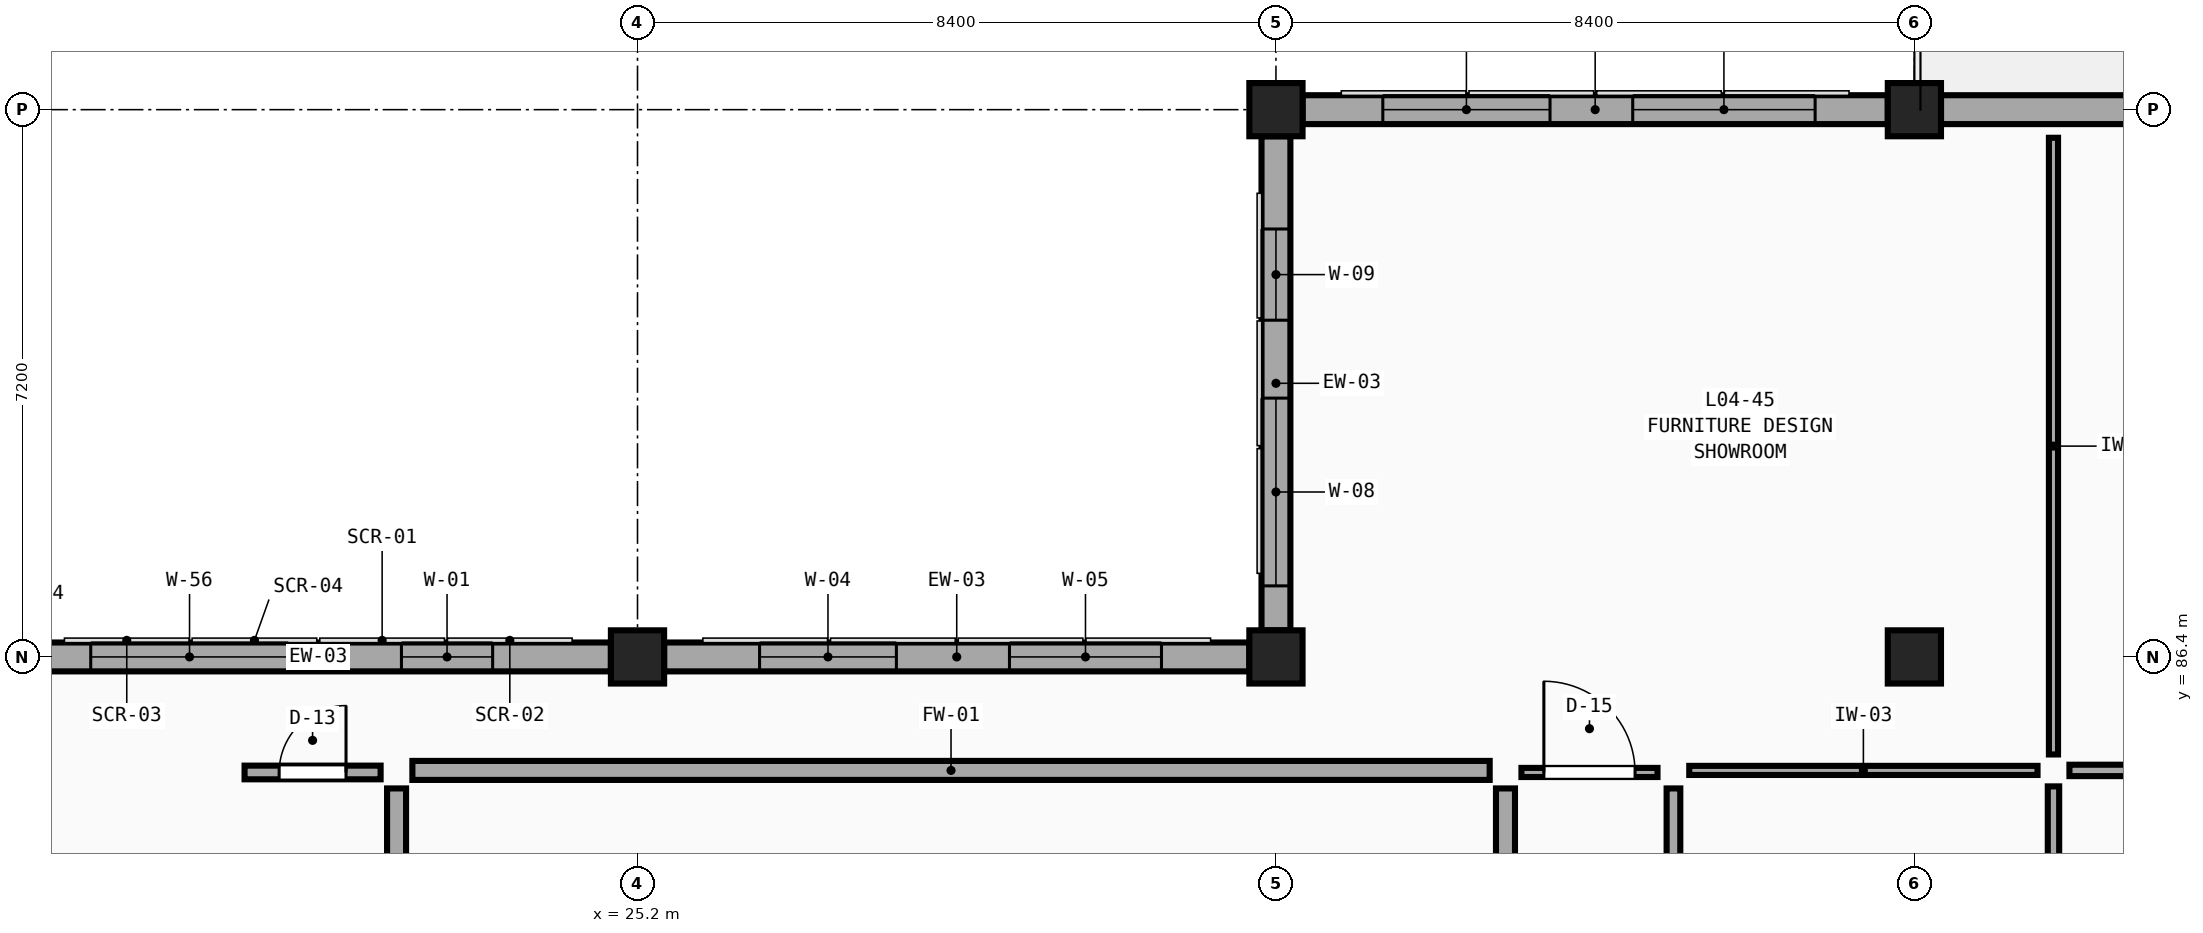
"""IFC4 building model, lengths in metres.
Left out: names, types, materials, properties, quantities, classifications, styles, units other than length and angle.
Written with IfcOpenShell. Run it as: python <this file> out.ifc"""

import sys

from ifc_helpers import new_model, si_unit, direction, frame, frame_2d, origin, origin_2d, place, context, subcontext, project, spatial, rectangle, extrude, element, fill, save


model = new_model("IFC4")
c1 = context("Model", 3, precision=1e-05, world=origin(), true_north=direction((0.0, 1.0)))
c2 = subcontext(c1, "Body", "Model", "MODEL_VIEW")
j1 = project(units=[si_unit("LENGTHUNIT", "METRE"), si_unit("PLANEANGLEUNIT", "RADIAN")], contexts=[c1])
p1 = place(None, origin())
s1 = spatial("IfcSite", under=j1, at=p1, CompositionType="ELEMENT")
p2 = place(p1, origin())
s2 = spatial("IfcBuilding", under=s1, at=p2, CompositionType="ELEMENT")
p3 = place(p2, frame((0.0, 0.0, 18.9)))
s3 = spatial("IfcBuildingStorey", under=s2, at=p3, CompositionType="ELEMENT", Elevation=18.9)
for number, where, z_axis, x_axis in (
    (1, (25.2, 86.4, 0.0), (0.0, 0.0, 1.0), (1.0, 0.0, 0.0)),
    (2, (33.6, 86.4, 0.0), (0.0, 0.0, 1.0), (1.0, 0.0, 0.0)),
    (3, (33.6, 93.6, 0.0), (0.0, 0.0, 1.0), (1.0, 0.0, 0.0)),
    (4, (42.0, 86.4, 0.0), (0.0, 0.0, 1.0), (1.0, 0.0, 0.0)),
    (5, (42.0, 93.6, 0.0), (0.0, 0.0, 1.0), (1.0, 0.0, 0.0)),
):
    element("IfcColumn", number, at=place(p3, frame(where, z_axis=z_axis, x_axis=x_axis)), inside=s3, PredefinedType="COLUMN", context=c2, shape_type="SweptSolid", body=[
        extrude(rectangle(XDim=0.7, YDim=0.7, at=origin_2d()), origin(), (0.0, 0.0, 1.0), 4.5),
    ])
p4 = place(p3, frame((17.15, 86.4, 0.0), z_axis=(0.0, 0.0, 1.0), x_axis=(1.0, 0.0, 0.0)))
e6 = element("IfcWall", 6, at=p4, inside=s3, PredefinedType="SOLIDWALL", context=c2, shape_type="SweptSolid", body=[
    extrude(rectangle(XDim=7.7, YDim=0.38, at=frame_2d((3.85, 0.0))), origin(), (0.0, 0.0, 1.0), 3.63),
])
p5 = place(p4, frame((0.856, 0.0, 0.75)))
e7 = element("IfcOpeningElement", 7, at=p5, cuts=e6, PredefinedType="OPENING", context=c2, shape_type="SweptSolid", body=[
    extrude(rectangle(XDim=2.6, YDim=2.73, at=frame_2d((1.3, 1.365))), frame((0.0, 0.21, 0.0), z_axis=(0.0, -1.0, 0.0), x_axis=(1.0, 0.0, 0.0)), (0.0, 0.0, 1.0), 0.42),
])
p6 = place(p4, frame((4.944, 0.0, 0.75)))
e8 = element("IfcOpeningElement", 8, at=p6, cuts=e6, PredefinedType="OPENING", context=c2, shape_type="SweptSolid", body=[
    extrude(rectangle(XDim=1.2, YDim=1.9, at=frame_2d((0.6, 0.95))), frame((0.0, 0.21, 0.0), z_axis=(0.0, -1.0, 0.0), x_axis=(1.0, 0.0, 0.0)), (0.0, 0.0, 1.0), 0.42),
])
p7 = place(p3, frame((25.55, 86.4, 0.0), z_axis=(0.0, 0.0, 1.0), x_axis=(1.0, 0.0, 0.0)))
e9 = element("IfcWall", 9, at=p7, inside=s3, PredefinedType="SOLIDWALL", context=c2, shape_type="SweptSolid", body=[
    extrude(rectangle(XDim=7.7, YDim=0.38, at=frame_2d((3.85, 0.0))), origin(), (0.0, 0.0, 1.0), 3.63),
])
p8 = place(p7, frame((1.256, 0.0, 0.75)))
e10 = element("IfcOpeningElement", 10, at=p8, cuts=e9, PredefinedType="OPENING", context=c2, shape_type="SweptSolid", body=[
    extrude(rectangle(XDim=1.8, YDim=1.9, at=frame_2d((0.9, 0.95))), frame((0.0, 0.21, 0.0), z_axis=(0.0, -1.0, 0.0), x_axis=(1.0, 0.0, 0.0)), (0.0, 0.0, 1.0), 0.42),
])
p9 = place(p7, frame((4.544, 0.0, 0.75)))
e11 = element("IfcOpeningElement", 11, at=p9, cuts=e9, PredefinedType="OPENING", context=c2, shape_type="SweptSolid", body=[
    extrude(rectangle(XDim=2.0, YDim=1.9, at=frame_2d((1.0, 0.95))), frame((0.0, 0.21, 0.0), z_axis=(0.0, -1.0, 0.0), x_axis=(1.0, 0.0, 0.0)), (0.0, 0.0, 1.0), 0.42),
])
p10 = place(p3, frame((33.95, 93.6, 0.0), z_axis=(0.0, 0.0, 1.0), x_axis=(1.0, 0.0, 0.0)))
e12 = element("IfcWall", 12, at=p10, inside=s3, PredefinedType="SOLIDWALL", context=c2, shape_type="SweptSolid", body=[
    extrude(rectangle(XDim=7.7, YDim=0.38, at=frame_2d((3.85, 0.0))), origin(), (0.0, 0.0, 1.0), 3.63),
])
p11 = place(p10, frame((1.056, 0.0, 0.75)))
e13 = element("IfcOpeningElement", 13, at=p11, cuts=e12, PredefinedType="OPENING", context=c2, shape_type="SweptSolid", body=[
    extrude(rectangle(XDim=2.2, YDim=1.9, at=frame_2d((1.1, 0.95))), frame((0.0, 0.21, 0.0), z_axis=(0.0, -1.0, 0.0), x_axis=(1.0, 0.0, 0.0)), (0.0, 0.0, 1.0), 0.42),
])
p12 = place(p10, frame((4.344, 0.0, 0.75)))
e14 = element("IfcOpeningElement", 14, at=p12, cuts=e12, PredefinedType="OPENING", context=c2, shape_type="SweptSolid", body=[
    extrude(rectangle(XDim=2.4, YDim=1.9, at=frame_2d((1.2, 0.95))), frame((0.0, 0.21, 0.0), z_axis=(0.0, -1.0, 0.0), x_axis=(1.0, 0.0, 0.0)), (0.0, 0.0, 1.0), 0.42),
])
p13 = place(p3, frame((33.6, 86.75, 0.0), z_axis=(0.0, 0.0, 1.0), x_axis=(0.0, 1.0, 0.0)))
e15 = element("IfcWall", 15, at=p13, inside=s3, PredefinedType="SOLIDWALL", context=c2, shape_type="SweptSolid", body=[
    extrude(rectangle(XDim=6.5, YDim=0.38, at=frame_2d((3.25, 0.0))), origin(), (0.0, 0.0, 1.0), 3.63),
])
p14 = place(p13, frame((0.585, 0.0, 0.75)))
e16 = element("IfcOpeningElement", 16, at=p14, cuts=e15, PredefinedType="OPENING", context=c2, shape_type="SweptSolid", body=[
    extrude(rectangle(XDim=2.47, YDim=1.9, at=frame_2d((1.235, 0.95))), frame((0.0, 0.21, 0.0), z_axis=(0.0, -1.0, 0.0), x_axis=(1.0, 0.0, 0.0)), (0.0, 0.0, 1.0), 0.42),
])
p15 = place(p13, frame((4.08, 0.0, 0.75)))
e17 = element("IfcOpeningElement", 17, at=p15, cuts=e15, PredefinedType="OPENING", context=c2, shape_type="SweptSolid", body=[
    extrude(rectangle(XDim=1.2, YDim=2.08, at=frame_2d((0.6, 1.04))), frame((0.0, 0.21, 0.0), z_axis=(0.0, -1.0, 0.0), x_axis=(1.0, 0.0, 0.0)), (0.0, 0.0, 1.0), 0.42),
])
p16 = place(p3, frame((42.35, 93.6, 0.0), z_axis=(0.0, 0.0, 1.0), x_axis=(1.0, 0.0, 0.0)))
e18 = element("IfcWall", 18, at=p16, inside=s3, PredefinedType="SOLIDWALL", context=c2, shape_type="SweptSolid", body=[
    extrude(rectangle(XDim=7.7, YDim=0.38, at=frame_2d((3.85, 0.0))), origin(), (0.0, 0.0, 1.0), 3.63),
])
p17 = place(p16, frame((2.95, 0.0, 0.0)))
e19 = element("IfcOpeningElement", 19, at=p17, cuts=e18, PredefinedType="OPENING", context=c2, shape_type="SweptSolid", body=[
    extrude(rectangle(XDim=1.8, YDim=2.25, at=frame_2d((0.9, 1.125))), frame((0.0, 0.21, 0.0), z_axis=(0.0, -1.0, 0.0), x_axis=(1.0, 0.0, 0.0)), (0.0, 0.0, 1.0), 0.42),
])
p18 = place(p3, frame((38.83, 73.62, 0.0), z_axis=(0.0, 0.0, 1.0), x_axis=(0.0, 1.0, 0.0)))
e20 = element("IfcWall", 20, at=p18, inside=s3, PredefinedType="PARTITIONING", context=c2, shape_type="SweptSolid", body=[
    extrude(rectangle(XDim=11.05, YDim=0.18, at=frame_2d((5.525, 0.0))), origin(), (0.0, 0.0, 1.0), 4.18),
])
p19 = place(p18, frame((4.845, 0.0, 0.0)))
e21 = element("IfcOpeningElement", 21, at=p19, cuts=e20, PredefinedType="OPENING", context=c2, shape_type="SweptSolid", body=[
    extrude(rectangle(XDim=1.36, YDim=2.29, at=frame_2d((0.68, 1.145))), frame((0.0, 0.11, 0.0), z_axis=(0.0, -1.0, 0.0), x_axis=(1.0, 0.0, 0.0)), (0.0, 0.0, 1.0), 0.22),
])
p20 = place(p3, frame((22.03, 73.78, 0.0), z_axis=(0.0, 0.0, 1.0), x_axis=(0.0, 1.0, 0.0)))
e22 = element("IfcWall", 22, at=p20, inside=s3, PredefinedType="SOLIDWALL", context=c2, shape_type="SweptSolid", body=[
    extrude(rectangle(XDim=10.89, YDim=0.25, at=frame_2d((5.445, 0.0))), origin(), (0.0, 0.0, 1.0), 4.18),
])
p21 = place(p20, frame((4.545, 0.0, 0.0)))
e23 = element("IfcOpeningElement", 23, at=p21, cuts=e22, PredefinedType="OPENING", context=c2, shape_type="SweptSolid", body=[
    extrude(rectangle(XDim=1.8, YDim=2.3, at=frame_2d((0.9, 1.15))), frame((0.0, 0.145, 0.0), z_axis=(0.0, -1.0, 0.0), x_axis=(1.0, 0.0, 0.0)), (0.0, 0.0, 1.0), 0.29),
])
p22 = place(p3, frame((36.62, 74.04, 0.0), z_axis=(0.0, 0.0, 1.0), x_axis=(0.0, 1.0, 0.0)))
e24 = element("IfcWall", 24, at=p22, inside=s3, PredefinedType="SOLIDWALL", context=c2, shape_type="SweptSolid", body=[
    extrude(rectangle(XDim=10.63, YDim=0.25, at=frame_2d((5.315, 0.0))), origin(), (0.0, 0.0, 1.0), 4.18),
])
p23 = place(p22, frame((4.415, 0.0, 0.0)))
e25 = element("IfcOpeningElement", 25, at=p23, cuts=e24, PredefinedType="OPENING", context=c2, shape_type="SweptSolid", body=[
    extrude(rectangle(XDim=1.8, YDim=2.3, at=frame_2d((0.9, 1.15))), frame((0.0, 0.145, 0.0), z_axis=(0.0, -1.0, 0.0), x_axis=(1.0, 0.0, 0.0)), (0.0, 0.0, 1.0), 0.29),
])
p24 = place(p3, frame((20.03, 84.88, 0.0), z_axis=(0.0, 0.0, 1.0), x_axis=(1.0, 0.0, 0.0)))
e26 = element("IfcWall", 26, at=p24, inside=s3, PredefinedType="PARTITIONING", context=c2, shape_type="SweptSolid", body=[
    extrude(rectangle(XDim=1.79, YDim=0.18, at=frame_2d((0.895, 0.0))), origin(), (0.0, 0.0, 1.0), 4.18),
])
p25 = place(p24, frame((0.455, 0.0, 0.0)))
e27 = element("IfcOpeningElement", 27, at=p25, cuts=e26, PredefinedType="OPENING", context=c2, shape_type="SweptSolid", body=[
    extrude(rectangle(XDim=0.88, YDim=2.21, at=frame_2d((0.44, 1.105))), frame((0.0, 0.11, 0.0), z_axis=(0.0, -1.0, 0.0), x_axis=(1.0, 0.0, 0.0)), (0.0, 0.0, 1.0), 0.22),
])
p26 = place(p3, frame((36.83, 84.88, 0.0), z_axis=(0.0, 0.0, 1.0), x_axis=(1.0, 0.0, 0.0)))
e28 = element("IfcWall", 28, at=p26, inside=s3, PredefinedType="PARTITIONING", context=c2, shape_type="SweptSolid", body=[
    extrude(rectangle(XDim=1.79, YDim=0.12, at=frame_2d((0.895, 0.0))), origin(), (0.0, 0.0, 1.0), 4.18),
])
p27 = place(p26, frame((0.295, 0.0, 0.0)))
e29 = element("IfcOpeningElement", 29, at=p27, cuts=e28, PredefinedType="OPENING", context=c2, shape_type="SweptSolid", body=[
    extrude(rectangle(XDim=1.2, YDim=2.21, at=frame_2d((0.6, 1.105))), frame((0.0, 0.08, 0.0), z_axis=(0.0, -1.0, 0.0), x_axis=(1.0, 0.0, 0.0)), (0.0, 0.0, 1.0), 0.16),
])
p28 = place(p3, frame((22.238, 84.907, 0.0), z_axis=(0.0, 0.0, 1.0), x_axis=(1.0, 0.0, 0.0)))
e30 = element("IfcWall", 30, at=p28, inside=s3, PredefinedType="SOLIDWALL", context=c2, shape_type="SweptSolid", body=[
    extrude(rectangle(XDim=14.174, YDim=0.25, at=frame_2d((7.087, 0.0))), origin(), (0.0, 0.0, 1.0), 4.18),
])
p29 = place(p3, frame((43.83, 73.88, 0.0), z_axis=(0.0, 0.0, 1.0), x_axis=(0.0, 1.0, 0.0)))
e31 = element("IfcWall", 31, at=p29, inside=s3, PredefinedType="PARTITIONING", context=c2, shape_type="SweptSolid", body=[
    extrude(rectangle(XDim=10.817, YDim=0.15, at=frame_2d((5.409, 0.0))), origin(), (0.0, 0.0, 1.0), 4.18),
])
p30 = place(p3, frame((44.04, 84.907, 0.0), z_axis=(0.0, 0.0, 1.0), x_axis=(1.0, 0.0, 0.0)))
e32 = element("IfcWall", 32, at=p30, inside=s3, PredefinedType="PARTITIONING", context=c2, shape_type="SweptSolid", body=[
    extrude(rectangle(XDim=9.17, YDim=0.15, at=frame_2d((4.585, 0.0))), origin(), (0.0, 0.0, 1.0), 4.18),
])
p31 = place(p3, frame((43.83, 85.117, 0.0), z_axis=(0.0, 0.0, 1.0), x_axis=(0.0, 1.0, 0.0)))
e33 = element("IfcWall", 33, at=p31, inside=s3, PredefinedType="PARTITIONING", context=c2, shape_type="SweptSolid", body=[
    extrude(rectangle(XDim=8.113, YDim=0.12, at=frame_2d((4.057, 0.0))), origin(), (0.0, 0.0, 1.0), 4.18),
])
p32 = place(p3, frame((39.038, 84.907, 0.0), z_axis=(0.0, 0.0, 1.0), x_axis=(1.0, 0.0, 0.0)))
e34 = element("IfcWall", 34, at=p32, inside=s3, PredefinedType="PARTITIONING", context=c2, shape_type="SweptSolid", body=[
    extrude(rectangle(XDim=4.582, YDim=0.12, at=frame_2d((2.291, 0.0))), origin(), (0.0, 0.0, 1.0), 4.18),
])
p33 = place(p5, origin())
e35 = element("IfcWindow", 35, at=p33, inside=s3, PartitioningType="TRIPLE_PANEL_VERTICAL", PredefinedType="WINDOW", context=c2, shape_type="SweptSolid", body=[
    extrude(rectangle(XDim=2.6, YDim=2.73, at=frame_2d((1.3, 1.365))), frame((0.0, 0.03, 0.0), z_axis=(0.0, -1.0, 0.0), x_axis=(1.0, 0.0, 0.0)), (0.0, 0.0, 1.0), 0.06),
])
fill(e7, e35)
p34 = place(p6, origin())
e36 = element("IfcWindow", 36, at=p34, inside=s3, PartitioningType="SINGLE_PANEL", PredefinedType="WINDOW", context=c2, shape_type="SweptSolid", body=[
    extrude(rectangle(XDim=1.2, YDim=1.9, at=frame_2d((0.6, 0.95))), frame((0.0, 0.03, 0.0), z_axis=(0.0, -1.0, 0.0), x_axis=(1.0, 0.0, 0.0)), (0.0, 0.0, 1.0), 0.06),
])
fill(e8, e36)
p35 = place(p8, origin())
e37 = element("IfcWindow", 37, at=p35, inside=s3, PartitioningType="DOUBLE_PANEL_VERTICAL", PredefinedType="WINDOW", context=c2, shape_type="SweptSolid", body=[
    extrude(rectangle(XDim=1.8, YDim=1.9, at=frame_2d((0.9, 0.95))), frame((0.0, 0.03, 0.0), z_axis=(0.0, -1.0, 0.0), x_axis=(1.0, 0.0, 0.0)), (0.0, 0.0, 1.0), 0.06),
])
fill(e10, e37)
p36 = place(p9, origin())
e38 = element("IfcWindow", 38, at=p36, inside=s3, PartitioningType="TRIPLE_PANEL_VERTICAL", PredefinedType="WINDOW", context=c2, shape_type="SweptSolid", body=[
    extrude(rectangle(XDim=2.0, YDim=1.9, at=frame_2d((1.0, 0.95))), frame((0.0, 0.03, 0.0), z_axis=(0.0, -1.0, 0.0), x_axis=(1.0, 0.0, 0.0)), (0.0, 0.0, 1.0), 0.06),
])
fill(e11, e38)
p37 = place(p11, origin())
e39 = element("IfcWindow", 39, at=p37, inside=s3, PartitioningType="TRIPLE_PANEL_VERTICAL", PredefinedType="WINDOW", context=c2, shape_type="SweptSolid", body=[
    extrude(rectangle(XDim=2.2, YDim=1.9, at=frame_2d((1.1, 0.95))), frame((0.0, 0.03, 0.0), z_axis=(0.0, -1.0, 0.0), x_axis=(1.0, 0.0, 0.0)), (0.0, 0.0, 1.0), 0.06),
])
fill(e13, e39)
p38 = place(p12, origin())
e40 = element("IfcWindow", 40, at=p38, inside=s3, PartitioningType="TRIPLE_PANEL_VERTICAL", PredefinedType="WINDOW", context=c2, shape_type="SweptSolid", body=[
    extrude(rectangle(XDim=2.4, YDim=1.9, at=frame_2d((1.2, 0.95))), frame((0.0, 0.03, 0.0), z_axis=(0.0, -1.0, 0.0), x_axis=(1.0, 0.0, 0.0)), (0.0, 0.0, 1.0), 0.06),
])
fill(e14, e40)
p39 = place(p14, origin())
e41 = element("IfcWindow", 41, at=p39, inside=s3, PartitioningType="TRIPLE_PANEL_VERTICAL", PredefinedType="WINDOW", context=c2, shape_type="SweptSolid", body=[
    extrude(rectangle(XDim=2.47, YDim=1.9, at=frame_2d((1.235, 0.95))), frame((0.0, 0.03, 0.0), z_axis=(0.0, -1.0, 0.0), x_axis=(1.0, 0.0, 0.0)), (0.0, 0.0, 1.0), 0.06),
])
fill(e16, e41)
p40 = place(p15, origin())
e42 = element("IfcWindow", 42, at=p40, inside=s3, PartitioningType="SINGLE_PANEL", PredefinedType="WINDOW", context=c2, shape_type="SweptSolid", body=[
    extrude(rectangle(XDim=1.2, YDim=2.08, at=frame_2d((0.6, 1.04))), frame((0.0, 0.03, 0.0), z_axis=(0.0, -1.0, 0.0), x_axis=(1.0, 0.0, 0.0)), (0.0, 0.0, 1.0), 0.06),
])
fill(e17, e42)
p41 = place(p25, origin())
e43 = element("IfcDoor", 43, at=p41, inside=s3, OperationType="SINGLE_SWING_RIGHT", PredefinedType="DOOR", context=c2, shape_type="SweptSolid", body=[
    extrude(rectangle(XDim=0.88, YDim=2.21, at=frame_2d((0.44, 1.105))), frame((0.0, 0.025, 0.0), z_axis=(0.0, -1.0, 0.0), x_axis=(1.0, 0.0, 0.0)), (0.0, 0.0, 1.0), 0.05),
])
fill(e27, e43)
p42 = place(p27, origin())
e44 = element("IfcDoor", 44, at=p42, inside=s3, OperationType="SINGLE_SWING_LEFT", PredefinedType="DOOR", context=c2, shape_type="SweptSolid", body=[
    extrude(rectangle(XDim=1.2, YDim=2.21, at=frame_2d((0.6, 1.105))), frame((0.0, 0.025, 0.0), z_axis=(0.0, -1.0, 0.0), x_axis=(1.0, 0.0, 0.0)), (0.0, 0.0, 1.0), 0.05),
])
fill(e29, e44)
save(model, sys.argv[1])
